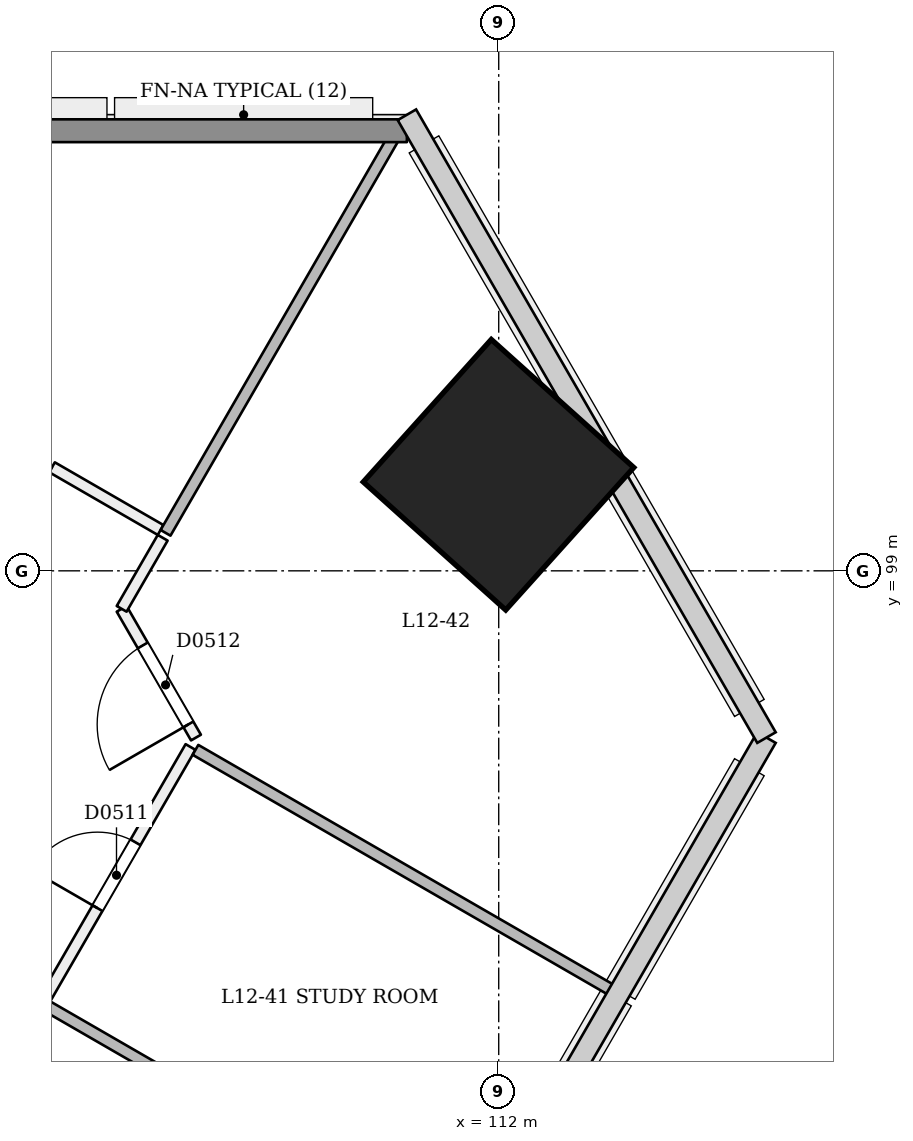
"""IFC4 building model, lengths in metres.
Left out: names, types, materials, properties, quantities, classifications, styles, units other than length and angle.
Written with IfcOpenShell. Run it as: python <this file> out.ifc"""

import sys

from ifc_helpers import new_model, si_unit, direction, frame, frame_2d, origin, origin_2d, place, context, subcontext, project, spatial, rectangle, extrude, element, fill, save


model = new_model("IFC4")
c1 = context("Model", 3, precision=1e-05, world=origin(), true_north=direction((0.0, 1.0)))
c2 = subcontext(c1, "Body", "Model", "MODEL_VIEW")
j1 = project(units=[si_unit("LENGTHUNIT", "METRE"), si_unit("PLANEANGLEUNIT", "RADIAN")], contexts=[c1])
p1 = place(None, origin())
s1 = spatial("IfcSite", under=j1, at=p1, CompositionType="ELEMENT")
p2 = place(p1, origin())
s2 = spatial("IfcBuilding", under=s1, at=p2, CompositionType="ELEMENT")
p3 = place(p2, frame((0.0, 0.0, 52.2)))
s3 = spatial("IfcBuildingStorey", under=s2, at=p3, CompositionType="ELEMENT", Elevation=52.2)
p4 = place(p3, frame((112.031, 100.253, 0.0), z_axis=(-0.028401796786, 0.009286506348, 0.999553449666), x_axis=(0.49888889343, -0.8663809353, 0.02222491757)))
e1 = element("IfcColumn", 1, at=p4, inside=s3, PredefinedType="COLUMN", context=c2, shape_type="SweptSolid", body=[
    extrude(rectangle(XDim=2.52, YDim=2.52, at=origin_2d()), origin(), (0.0, 0.0, 1.0), 3.602),
])
p5 = place(p3, frame((86.05, 58.757, 0.0), z_axis=(0.0, 0.0, 1.0), x_axis=(0.499999296855, 0.866025809745, 0.0)))
e2 = element("IfcWall", 2, at=p5, inside=s3, PredefinedType="PARTITIONING", context=c2, shape_type="SweptSolid", body=[
    extrude(rectangle(XDim=43.792, YDim=0.15, at=frame_2d((21.896, 0.0))), origin(), (0.0, 0.0, 1.0), 2.7),
])
p6 = place(p5, frame((3.598, 0.0, 0.0)))
e3 = element("IfcOpeningElement", 3, at=p6, cuts=e2, PredefinedType="OPENING", context=c2, shape_type="SweptSolid", body=[
    extrude(rectangle(XDim=1.2, YDim=2.1, at=frame_2d((0.6, 1.05))), frame((0.0, 0.085, 0.0), z_axis=(0.0, -1.0, 0.0), x_axis=(1.0, 0.0, 0.0)), (0.0, 0.0, 1.0), 0.171),
])
p7 = place(p5, frame((11.176, 0.0, 0.0)))
e4 = element("IfcOpeningElement", 4, at=p7, cuts=e2, PredefinedType="OPENING", context=c2, shape_type="SweptSolid", body=[
    extrude(rectangle(XDim=1.0, YDim=2.1, at=frame_2d((0.5, 1.05))), frame((0.0, 0.085, 0.0), z_axis=(0.0, -1.0, 0.0), x_axis=(1.0, 0.0, 0.0)), (0.0, 0.0, 1.0), 0.171),
])
p8 = place(p5, frame((13.616, 0.0, 0.0)))
e5 = element("IfcOpeningElement", 5, at=p8, cuts=e2, PredefinedType="OPENING", context=c2, shape_type="SweptSolid", body=[
    extrude(rectangle(XDim=1.0, YDim=2.1, at=frame_2d((0.5, 1.05))), frame((0.0, 0.085, 0.0), z_axis=(0.0, -1.0, 0.0), x_axis=(1.0, 0.0, 0.0)), (0.0, 0.0, 1.0), 0.171),
])
p9 = place(p5, frame((20.176, 0.0, 0.0)))
e6 = element("IfcOpeningElement", 6, at=p9, cuts=e2, PredefinedType="OPENING", context=c2, shape_type="SweptSolid", body=[
    extrude(rectangle(XDim=1.0, YDim=2.1, at=frame_2d((0.5, 1.05))), frame((0.0, 0.085, 0.0), z_axis=(0.0, -1.0, 0.0), x_axis=(1.0, 0.0, 0.0)), (0.0, 0.0, 1.0), 0.171),
])
p10 = place(p5, frame((22.616, 0.0, 0.0)))
e7 = element("IfcOpeningElement", 7, at=p10, cuts=e2, PredefinedType="OPENING", context=c2, shape_type="SweptSolid", body=[
    extrude(rectangle(XDim=1.0, YDim=2.1, at=frame_2d((0.5, 1.05))), frame((0.0, 0.085, 0.0), z_axis=(0.0, -1.0, 0.0), x_axis=(1.0, 0.0, 0.0)), (0.0, 0.0, 1.0), 0.171),
])
p11 = place(p5, frame((29.176, 0.0, 0.0)))
e8 = element("IfcOpeningElement", 8, at=p11, cuts=e2, PredefinedType="OPENING", context=c2, shape_type="SweptSolid", body=[
    extrude(rectangle(XDim=1.0, YDim=2.1, at=frame_2d((0.5, 1.05))), frame((0.0, 0.085, 0.0), z_axis=(0.0, -1.0, 0.0), x_axis=(1.0, 0.0, 0.0)), (0.0, 0.0, 1.0), 0.171),
])
p12 = place(p5, frame((31.616, 0.0, 0.0)))
e9 = element("IfcOpeningElement", 9, at=p12, cuts=e2, PredefinedType="OPENING", context=c2, shape_type="SweptSolid", body=[
    extrude(rectangle(XDim=1.0, YDim=2.1, at=frame_2d((0.5, 1.05))), frame((0.0, 0.085, 0.0), z_axis=(0.0, -1.0, 0.0), x_axis=(1.0, 0.0, 0.0)), (0.0, 0.0, 1.0), 0.171),
])
p13 = place(p5, frame((38.176, 0.0, 0.0)))
e10 = element("IfcOpeningElement", 10, at=p13, cuts=e2, PredefinedType="OPENING", context=c2, shape_type="SweptSolid", body=[
    extrude(rectangle(XDim=1.0, YDim=2.1, at=frame_2d((0.5, 1.05))), frame((0.0, 0.085, 0.0), z_axis=(0.0, -1.0, 0.0), x_axis=(1.0, 0.0, 0.0)), (0.0, 0.0, 1.0), 0.171),
])
p14 = place(p5, frame((41.344, 0.0, 0.0)))
e11 = element("IfcOpeningElement", 11, at=p14, cuts=e2, PredefinedType="OPENING", context=c2, shape_type="SweptSolid", body=[
    extrude(rectangle(XDim=1.0, YDim=2.1, at=frame_2d((0.5, 1.05))), frame((0.0, 0.085, 0.0), z_axis=(0.0, -1.0, 0.0), x_axis=(1.0, 0.0, 0.0)), (0.0, 0.0, 1.0), 0.171),
])
p15 = place(p3, frame((108.017, 96.806, 0.0), z_axis=(0.0, 0.0, 1.0), x_axis=(-0.499992620187, 0.866029664479, 0.0)))
e12 = element("IfcWall", 12, at=p15, inside=s3, PredefinedType="PARTITIONING", context=c2, shape_type="SweptSolid", body=[
    extrude(rectangle(XDim=1.956, YDim=0.15, at=frame_2d((0.978, 0.0))), origin(), (0.0, 0.0, 1.0), 3.1),
])
p16 = place(p15, frame((0.2, 0.0, 0.0)))
e13 = element("IfcOpeningElement", 13, at=p16, cuts=e12, PredefinedType="OPENING", context=c2, shape_type="SweptSolid", body=[
    extrude(rectangle(XDim=1.2, YDim=2.1, at=frame_2d((0.6, 1.05))), frame((0.0, 0.085, 0.0), z_axis=(0.0, -1.0, 0.0), x_axis=(1.0, 0.0, 0.0)), (0.0, 0.0, 1.0), 0.171),
])
p17 = place(p3, frame((107.039, 98.5, 0.0), z_axis=(0.0, 0.0, 1.0), x_axis=(0.499957341738, 0.866050031143, 0.0)))
e14 = element("IfcWall", 14, at=p17, inside=s3, PredefinedType="PARTITIONING", context=c2, shape_type="SweptSolid", body=[
    extrude(rectangle(XDim=1.08, YDim=0.15, at=frame_2d((0.54, 0.0))), origin(), (0.0, 0.0, 1.0), 3.1),
])
p18 = place(p3, frame((107.552, 99.538, 0.0), z_axis=(0.0, 0.0, 1.0), x_axis=(-0.866040211805, 0.499974350878, 0.0)))
e15 = element("IfcWall", 15, at=p18, inside=s3, PredefinedType="PARTITIONING", context=c2, shape_type="SweptSolid", body=[
    extrude(rectangle(XDim=1.65, YDim=0.15, at=frame_2d((0.825, 0.0))), origin(), (0.0, 0.0, 1.0), 3.1),
])
for number, where, z_axis, x_axis in (
    (16, (111.558, 90.098, 0.0), (0.0, 0.0, 1.0), (-0.866, 0.5, 0.0)),
    (17, (113.506, 93.472, 0.0), (0.0, 0.0, 1.0), (-0.866, 0.5, 0.0)),
):
    element("IfcWall", number, at=place(p3, frame(where, z_axis=z_axis, x_axis=x_axis)), inside=s3, PredefinedType="PARTITIONING", context=c2, shape_type="SweptSolid", body=[
        extrude(rectangle(XDim=6.345, YDim=0.15, at=frame_2d((3.173, 0.0))), origin(), (0.0, 0.0, 1.0), 2.6),
    ])
p19 = place(p3, frame((110.734, 104.9, 0.0), z_axis=(0.0, 0.0, 1.0), x_axis=(-0.500034261589, -0.866005621943, 0.0)))
e18 = element("IfcWall", 18, at=p19, inside=s3, PredefinedType="PARTITIONING", context=c2, shape_type="SweptSolid", body=[
    extrude(rectangle(XDim=6.235, YDim=0.15, at=frame_2d((3.118, 0.0))), origin(), (0.0, 0.0, 1.0), 2.6),
])
p20 = place(p3, frame((59.208, 104.79, 0.0), z_axis=(0.0, 0.0, 1.0), x_axis=(1.0, 0.0, 0.0)))
e19 = element("IfcWall", 19, at=p20, inside=s3, PredefinedType="SOLIDWALL", context=c2, shape_type="SweptSolid", body=[
    extrude(rectangle(XDim=51.584, YDim=0.3, at=frame_2d((25.792, 0.0))), origin(), (0.0, 0.0, 1.0), 2.6),
])
p21 = place(p14, origin())
e20 = element("IfcDoor", 20, at=p21, inside=s3, OperationType="SINGLE_SWING_LEFT", PredefinedType="NOTDEFINED", context=c2, shape_type="SweptSolid", body=[
    extrude(rectangle(XDim=1.0, YDim=2.1, at=frame_2d((0.5, 1.05))), frame((0.0, 0.025, 0.0), z_axis=(0.0, -1.0, 0.0), x_axis=(1.0, 0.0, 0.0)), (0.0, 0.0, 1.0), 0.05),
])
fill(e11, e20)
p22 = place(p16, origin())
e21 = element("IfcDoor", 21, at=p22, inside=s3, OperationType="SINGLE_SWING_LEFT", PredefinedType="NOTDEFINED", context=c2, shape_type="SweptSolid", body=[
    extrude(rectangle(XDim=1.2, YDim=2.1, at=frame_2d((0.6, 1.05))), frame((0.0, 0.025, 0.0), z_axis=(0.0, -1.0, 0.0), x_axis=(1.0, 0.0, 0.0)), (0.0, 0.0, 1.0), 0.05),
])
fill(e13, e21)
save(model, sys.argv[1])
